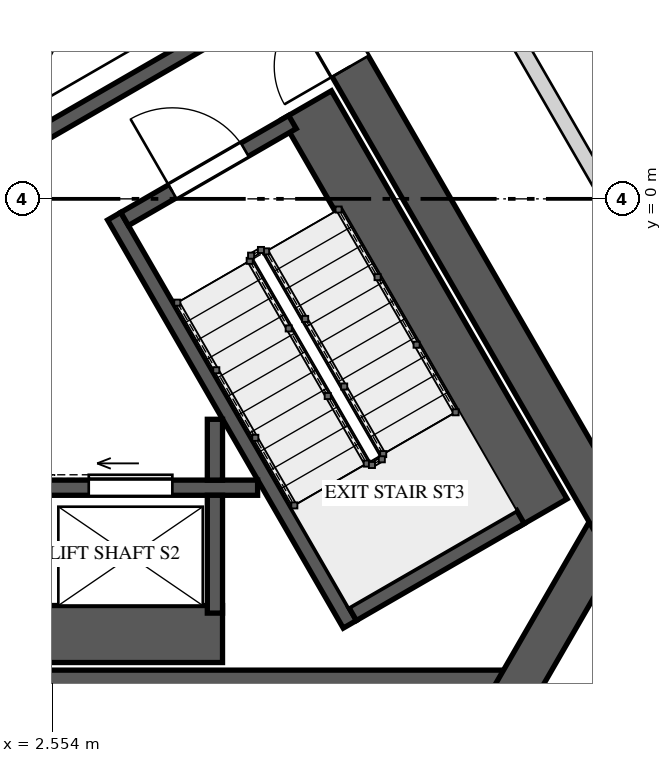
"""IFC4 building model, lengths in metres.
Left out: names, types, materials, properties, quantities, classifications, styles, units other than length and angle.
Written with IfcOpenShell. Run it as: python <this file> out.ifc"""

import sys

from ifc_helpers import new_model, si_unit, direction, frame, frame_2d, origin, place, context, subcontext, project, spatial, rectangle, extrude, element, fill, save


model = new_model("IFC4")
c1 = context("Model", 3, precision=1e-05, world=origin(), true_north=direction((0.0, 1.0)))
c2 = subcontext(c1, "Body", "Model", "MODEL_VIEW")
j1 = project(units=[si_unit("LENGTHUNIT", "METRE"), si_unit("PLANEANGLEUNIT", "RADIAN")], contexts=[c1])
p1 = place(None, origin())
s1 = spatial("IfcSite", under=j1, at=p1, CompositionType="ELEMENT")
p2 = place(p1, origin())
s2 = spatial("IfcBuilding", under=s1, at=p2, CompositionType="ELEMENT")
p3 = place(p2, frame((0.0, 0.0, 320.4)))
s3 = spatial("IfcBuildingStorey", under=s2, at=p3, CompositionType="ELEMENT", Elevation=320.4)
p4 = place(p3, frame((-8.646, -6.475, 0.0), z_axis=(0.0, 0.0, 1.0), x_axis=(1.0, 0.0, 0.0)))
e1 = element("IfcWall", 1, at=p4, inside=s3, PredefinedType="SHEAR", context=c2, shape_type="SweptSolid", body=[
    extrude(rectangle(XDim=17.292, YDim=0.55, at=frame_2d((8.646, 0.0))), origin(), (0.0, 0.0, 1.0), 4.0),
])
p5 = place(p4, frame((6.851, 0.0, 0.0)))
e2 = element("IfcOpeningElement", 2, at=p5, cuts=e1, PredefinedType="OPENING", context=c2, shape_type="SweptSolid", body=[
    extrude(rectangle(XDim=1.0, YDim=2.4, at=frame_2d((0.5, 1.2))), frame((0.0, 0.285, 0.0), z_axis=(0.0, -1.0, 0.0), x_axis=(1.0, 0.0, 0.0)), (0.0, 0.0, 1.0), 0.57),
])
p6 = place(p3, frame((8.566, -6.613, 0.0), z_axis=(0.0, 0.0, 1.0), x_axis=(0.499995765644, 0.866027848477, 0.0)))
e3 = element("IfcWall", 3, at=p6, inside=s3, PredefinedType="SHEAR", context=c2, shape_type="SweptSolid", body=[
    extrude(rectangle(XDim=2.887, YDim=0.55, at=frame_2d((1.443, 0.0))), origin(), (0.0, 0.0, 1.0), 4.0),
])
p7 = place(p3, frame((9.93, -4.25, 0.0), z_axis=(0.0, 0.0, 1.0), x_axis=(-0.499994590896, 0.86602852671, 0.0)))
e4 = element("IfcWall", 4, at=p7, inside=s3, PredefinedType="SHEAR", context=c2, shape_type="SweptSolid", body=[
    extrude(rectangle(XDim=17.292, YDim=0.55, at=frame_2d((8.646, 0.0))), origin(), (0.0, 0.0, 1.0), 4.0),
])
p8 = place(p7, frame((6.921, 0.0, 0.0)))
e5 = element("IfcOpeningElement", 5, at=p8, cuts=e4, PredefinedType="OPENING", context=c2, shape_type="SweptSolid", body=[
    extrude(rectangle(XDim=1.0, YDim=2.4, at=frame_2d((0.5, 1.2))), frame((0.0, 0.285, 0.0), z_axis=(0.0, -1.0, 0.0), x_axis=(1.0, 0.0, 0.0)), (0.0, 0.0, 1.0), 0.57),
])
p9 = place(p3, frame((8.998, -4.135, 0.0), z_axis=(0.0, 0.0, 1.0), x_axis=(-0.500009909098, 0.866019682689, 0.0)))
e6 = element("IfcWall", 6, at=p9, inside=s3, PredefinedType="SOLIDWALL", context=c2, shape_type="SweptSolid", body=[
    extrude(rectangle(XDim=6.2, YDim=0.75, at=frame_2d((3.1, 0.0))), origin(), (0.0, 0.0, 1.0), 3.65),
])
p10 = place(p3, frame((6.465, -5.597, 0.0), z_axis=(0.0, 0.0, 1.0), x_axis=(-0.49998037582, 0.866036733513, 0.0)))
e7 = element("IfcWall", 7, at=p10, inside=s3, PredefinedType="SOLIDWALL", context=c2, shape_type="SweptSolid", body=[
    extrude(rectangle(XDim=6.2, YDim=0.2, at=frame_2d((3.1, 0.0))), origin(), (0.0, 0.0, 1.0), 3.65),
])
p11 = place(p3, frame((6.501, -5.461, 0.0), z_axis=(0.0, 0.0, 1.0), x_axis=(0.865989465428, 0.500062241894, 0.0)))
e8 = element("IfcWall", 8, at=p11, inside=s3, PredefinedType="SOLIDWALL", context=c2, shape_type="SweptSolid", body=[
    extrude(rectangle(XDim=2.55, YDim=0.2, at=frame_2d((1.275, 0.0))), origin(), (0.0, 0.0, 1.0), 3.65),
])
p12 = place(p3, frame((3.501, -0.265, 0.0), z_axis=(0.0, 0.0, 1.0), x_axis=(0.866030925526, 0.499990435942, 0.0)))
e9 = element("IfcWall", 9, at=p12, inside=s3, PredefinedType="SOLIDWALL", context=c2, shape_type="SweptSolid", body=[
    extrude(rectangle(XDim=2.55, YDim=0.2, at=frame_2d((1.275, 0.0))), origin(), (0.0, 0.0, 1.0), 3.65),
])
p13 = place(p12, frame((0.725, 0.0, 0.0)))
e10 = element("IfcOpeningElement", 10, at=p13, cuts=e9, PredefinedType="OPENING", context=c2, shape_type="SweptSolid", body=[
    extrude(rectangle(XDim=1.1, YDim=2.4, at=frame_2d((0.55, 1.2))), frame((0.0, 0.11, 0.0), z_axis=(0.0, -1.0, 0.0), x_axis=(1.0, 0.0, 0.0)), (0.0, 0.0, 1.0), 0.22),
])
p14 = place(p3, frame((-0.71, -3.8, 0.0), z_axis=(0.0, 0.0, 1.0), x_axis=(1.0, 0.0, 0.0)))
e11 = element("IfcWall", 11, at=p14, inside=s3, PredefinedType="SOLIDWALL", context=c2, shape_type="SweptSolid", body=[
    extrude(rectangle(XDim=5.961, YDim=0.2, at=frame_2d((2.981, 0.0))), origin(), (0.0, 0.0, 1.0), 3.65),
])
p15 = place(p14, frame((1.09, 0.0, 0.0)))
e12 = element("IfcOpeningElement", 12, at=p15, cuts=e11, PredefinedType="OPENING", context=c2, shape_type="SweptSolid", body=[
    extrude(rectangle(XDim=1.1, YDim=2.1, at=frame_2d((0.55, 1.05))), frame((0.0, 0.11, 0.0), z_axis=(0.0, -1.0, 0.0), x_axis=(1.0, 0.0, 0.0)), (0.0, 0.0, 1.0), 0.22),
])
p16 = place(p14, frame((3.74, 0.0, 0.0)))
e13 = element("IfcOpeningElement", 13, at=p16, cuts=e11, PredefinedType="OPENING", context=c2, shape_type="SweptSolid", body=[
    extrude(rectangle(XDim=1.1, YDim=2.1, at=frame_2d((0.55, 1.05))), frame((0.0, 0.11, 0.0), z_axis=(0.0, -1.0, 0.0), x_axis=(1.0, 0.0, 0.0)), (0.0, 0.0, 1.0), 0.22),
])
p17 = place(p3, frame((-0.71, -5.725, 0.0), z_axis=(0.0, 0.0, 1.0), x_axis=(1.0, 0.0, 0.0)))
e14 = element("IfcWall", 14, at=p17, inside=s3, PredefinedType="SOLIDWALL", context=c2, shape_type="SweptSolid", body=[
    extrude(rectangle(XDim=5.5, YDim=0.75, at=frame_2d((2.75, 0.0))), origin(), (0.0, 0.0, 1.0), 3.65),
])
p18 = place(p3, frame((4.69, -3.9, 0.0), z_axis=(0.0, 0.0, 1.0), x_axis=(0.0, -1.0, 0.0)))
e15 = element("IfcWall", 15, at=p18, inside=s3, PredefinedType="SOLIDWALL", context=c2, shape_type="SweptSolid", body=[
    extrude(rectangle(XDim=1.55, YDim=0.2, at=frame_2d((0.775, 0.0))), origin(), (0.0, 0.0, 1.0), 3.65),
])
p19 = place(p3, frame((4.69, -2.9, 0.0), z_axis=(0.0, 0.0, 1.0), x_axis=(0.0, -1.0, 0.0)))
e16 = element("IfcWall", 16, at=p19, inside=s3, PredefinedType="SOLIDWALL", context=c2, shape_type="SweptSolid", body=[
    extrude(rectangle(XDim=0.8, YDim=0.2, at=frame_2d((0.4, 0.0))), origin(), (0.0, 0.0, 1.0), 3.65),
])
p20 = place(p3, frame((2.227, 0.743, 0.0), z_axis=(0.0, 0.0, 1.0), x_axis=(0.866035871367, 0.499981869177, 0.0)))
e17 = element("IfcWall", 17, at=p20, inside=s3, PredefinedType="SOLIDWALL", context=c2, shape_type="SweptSolid", body=[
    extrude(rectangle(XDim=3.15, YDim=0.2, at=frame_2d((1.575, 0.0))), origin(), (0.0, 0.0, 1.0), 3.65),
])
p21 = place(p3, frame((9.42, 3.483, 0.0), z_axis=(0.0, 0.0, 1.0), x_axis=(0.50002680699, -0.866009926209, 0.0)))
e18 = element("IfcWall", 18, at=p21, inside=s3, PredefinedType="PARTITIONING", context=c2, shape_type="SweptSolid", body=[
    extrude(rectangle(XDim=4.12, YDim=0.15, at=frame_2d((2.06, 0.0))), origin(), (0.0, 0.0, 1.0), 3.65),
])
p22 = place(p21, frame((2.808, 0.0, 0.0)))
e19 = element("IfcOpeningElement", 19, at=p22, cuts=e18, PredefinedType="OPENING", context=c2, shape_type="SweptSolid", body=[
    extrude(rectangle(XDim=0.95, YDim=2.4, at=frame_2d((0.475, 1.2))), frame((0.0, 0.085, 0.0), z_axis=(0.0, -1.0, 0.0), x_axis=(1.0, 0.0, 0.0)), (0.0, 0.0, 1.0), 0.17),
])
p23 = place(p3, frame((8.169, 2.951, 0.0), z_axis=(0.0, 0.0, 1.0), x_axis=(0.499959115548, -0.866049007147, 0.0)))
e20 = element("IfcWall", 20, at=p23, inside=s3, PredefinedType="SOLIDWALL", context=c2, shape_type="SweptSolid", body=[
    extrude(rectangle(XDim=3.423, YDim=0.2, at=frame_2d((1.711, 0.0))), origin(), (0.0, 0.0, 1.0), 3.65),
])
p24 = place(p13, origin())
e21 = element("IfcDoor", 21, at=p24, inside=s3, OperationType="SINGLE_SWING_RIGHT", PredefinedType="DOOR", context=c2, shape_type="SweptSolid", body=[
    extrude(rectangle(XDim=1.1, YDim=2.4, at=frame_2d((0.55, 1.2))), frame((0.0, 0.025, 0.0), z_axis=(0.0, -1.0, 0.0), x_axis=(1.0, 0.0, 0.0)), (0.0, 0.0, 1.0), 0.05),
])
fill(e10, e21)
p25 = place(p16, origin())
e22 = element("IfcDoor", 22, at=p25, inside=s3, OperationType="SLIDING_TO_LEFT", PredefinedType="DOOR", context=c2, shape_type="SweptSolid", body=[
    extrude(rectangle(XDim=1.1, YDim=2.1, at=frame_2d((0.55, 1.05))), frame((0.0, 0.025, 0.0), z_axis=(0.0, -1.0, 0.0), x_axis=(1.0, 0.0, 0.0)), (0.0, 0.0, 1.0), 0.05),
])
fill(e13, e22)
p26 = place(p8, origin())
e23 = element("IfcDoor", 23, at=p26, inside=s3, OperationType="SINGLE_SWING_LEFT", PredefinedType="DOOR", context=c2, shape_type="SweptSolid", body=[
    extrude(rectangle(XDim=1.0, YDim=2.4, at=frame_2d((0.5, 1.2))), frame((0.0, 0.025, 0.0), z_axis=(0.0, -1.0, 0.0), x_axis=(1.0, 0.0, 0.0)), (0.0, 0.0, 1.0), 0.05),
])
fill(e5, e23)
save(model, sys.argv[1])
